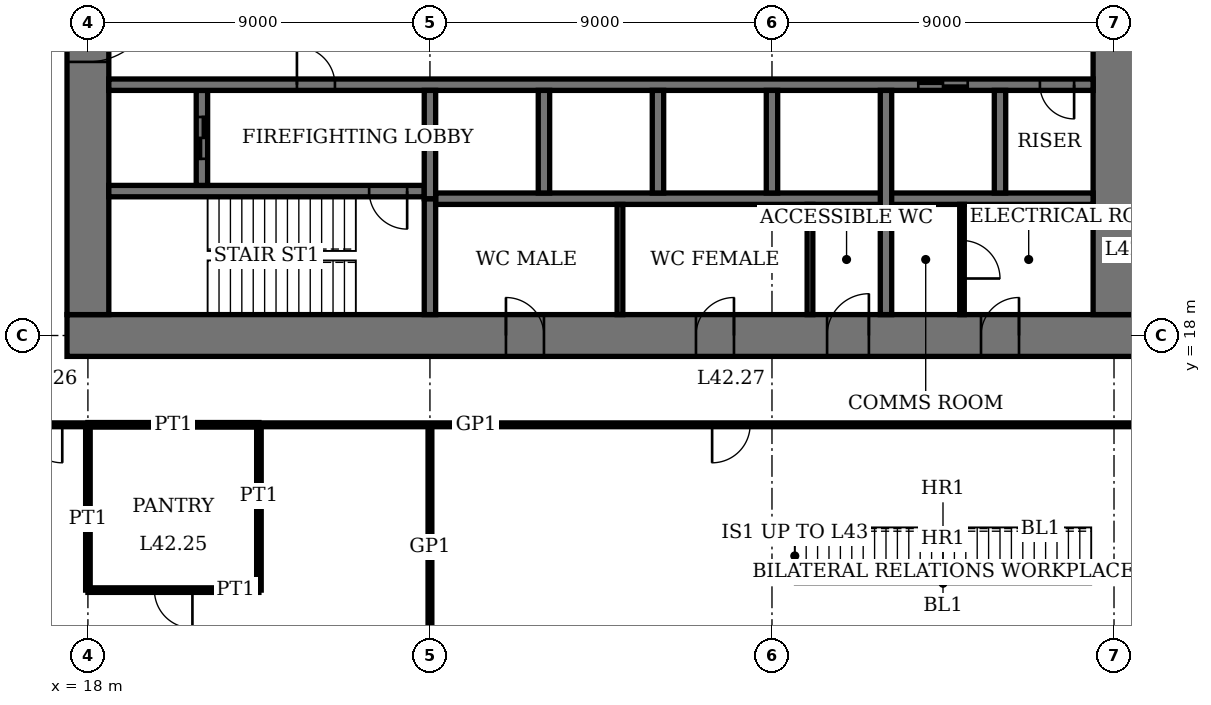
"""IFC4 building model, lengths in metres.
Left out: names, types, materials, properties, quantities, classifications, styles, units other than length and angle.
Written with IfcOpenShell. Run it as: python <this file> out.ifc"""

import sys

from ifc_helpers import new_model, si_unit, direction, frame, frame_2d, origin, place, context, subcontext, project, spatial, rectangle, extrude, element, fill, save


model = new_model("IFC4")
c1 = context("Model", 3, precision=1e-05, world=origin(), true_north=direction((0.0, 1.0)))
c2 = subcontext(c1, "Body", "Model", "MODEL_VIEW")
j1 = project(units=[si_unit("LENGTHUNIT", "METRE"), si_unit("PLANEANGLEUNIT", "RADIAN")], contexts=[c1])
p1 = place(None, origin())
s1 = spatial("IfcSite", under=j1, at=p1, CompositionType="ELEMENT")
p2 = place(p1, origin())
s2 = spatial("IfcBuilding", under=s1, at=p2, CompositionType="ELEMENT")
p3 = place(p2, frame((0.0, 0.0, 174.2)))
s3 = spatial("IfcBuildingStorey", under=s2, at=p3, CompositionType="ELEMENT", Elevation=174.2)
p4 = place(p3, frame((17.45, 18.0, 0.0), z_axis=(0.0, 0.0, 1.0), x_axis=(1.0, 0.0, 0.0)))
e1 = element("IfcWall", 1, at=p4, inside=s3, PredefinedType="SHEAR", context=c2, shape_type="SweptSolid", body=[
    extrude(rectangle(XDim=28.1, YDim=1.1, at=frame_2d((14.05, 0.0))), origin(), (0.0, 0.0, 1.0), 4.0),
])
p5 = place(p4, frame((11.55, 0.0, 0.0)))
e2 = element("IfcOpeningElement", 2, at=p5, cuts=e1, PredefinedType="OPENING", context=c2, shape_type="SweptSolid", body=[
    extrude(rectangle(XDim=1.0, YDim=2.4, at=frame_2d((0.5, 1.2))), frame((0.0, 0.56, 0.0), z_axis=(0.0, -1.0, 0.0), x_axis=(1.0, 0.0, 0.0)), (0.0, 0.0, 1.0), 1.12),
])
p6 = place(p4, frame((16.55, 0.0, 0.0)))
e3 = element("IfcOpeningElement", 3, at=p6, cuts=e1, PredefinedType="OPENING", context=c2, shape_type="SweptSolid", body=[
    extrude(rectangle(XDim=1.0, YDim=2.4, at=frame_2d((0.5, 1.2))), frame((0.0, 0.56, 0.0), z_axis=(0.0, -1.0, 0.0), x_axis=(1.0, 0.0, 0.0)), (0.0, 0.0, 1.0), 1.12),
])
p7 = place(p4, frame((20.0, 0.0, 0.0)))
e4 = element("IfcOpeningElement", 4, at=p7, cuts=e1, PredefinedType="OPENING", context=c2, shape_type="SweptSolid", body=[
    extrude(rectangle(XDim=1.1, YDim=2.4, at=frame_2d((0.55, 1.2))), frame((0.0, 0.56, 0.0), z_axis=(0.0, -1.0, 0.0), x_axis=(1.0, 0.0, 0.0)), (0.0, 0.0, 1.0), 1.12),
])
p8 = place(p4, frame((24.05, 0.0, 0.0)))
e5 = element("IfcOpeningElement", 5, at=p8, cuts=e1, PredefinedType="OPENING", context=c2, shape_type="SweptSolid", body=[
    extrude(rectangle(XDim=1.0, YDim=2.4, at=frame_2d((0.5, 1.2))), frame((0.0, 0.56, 0.0), z_axis=(0.0, -1.0, 0.0), x_axis=(1.0, 0.0, 0.0)), (0.0, 0.0, 1.0), 1.12),
])
p9 = place(p3, frame((18.0, 35.45, 0.0), z_axis=(0.0, 0.0, 1.0), x_axis=(0.0, -1.0, 0.0)))
e6 = element("IfcWall", 6, at=p9, inside=s3, PredefinedType="SHEAR", context=c2, shape_type="SweptSolid", body=[
    extrude(rectangle(XDim=16.9, YDim=1.1, at=frame_2d((8.45, 0.0))), origin(), (0.0, 0.0, 1.0), 4.0),
])
p10 = place(p9, frame((8.45, 0.0, 0.0)))
e7 = element("IfcOpeningElement", 7, at=p10, cuts=e6, PredefinedType="OPENING", context=c2, shape_type="SweptSolid", body=[
    extrude(rectangle(XDim=1.8, YDim=2.4, at=frame_2d((0.9, 1.2))), frame((0.0, 0.56, 0.0), z_axis=(0.0, -1.0, 0.0), x_axis=(1.0, 0.0, 0.0)), (0.0, 0.0, 1.0), 1.12),
])
p11 = place(p3, frame((45.0, 18.55, 0.0), z_axis=(0.0, 0.0, 1.0), x_axis=(0.0, 1.0, 0.0)))
e8 = element("IfcWall", 8, at=p11, inside=s3, PredefinedType="SHEAR", context=c2, shape_type="SweptSolid", body=[
    extrude(rectangle(XDim=16.9, YDim=1.1, at=frame_2d((8.45, 0.0))), origin(), (0.0, 0.0, 1.0), 4.0),
])
p12 = place(p11, frame((8.45, 0.0, 0.0)))
e9 = element("IfcOpeningElement", 9, at=p12, cuts=e8, PredefinedType="OPENING", context=c2, shape_type="SweptSolid", body=[
    extrude(rectangle(XDim=1.8, YDim=2.4, at=frame_2d((0.9, 1.2))), frame((0.0, 0.56, 0.0), z_axis=(0.0, -1.0, 0.0), x_axis=(1.0, 0.0, 0.0)), (0.0, 0.0, 1.0), 1.12),
])
p13 = place(p3, frame((18.55, 21.8, 0.0), z_axis=(0.0, 0.0, 1.0), x_axis=(1.0, 0.0, 0.0)))
e10 = element("IfcWall", 10, at=p13, inside=s3, PredefinedType="SHEAR", context=c2, shape_type="SweptSolid", body=[
    extrude(rectangle(XDim=8.3, YDim=0.3, at=frame_2d((4.15, 0.0))), origin(), (0.0, 0.0, 1.0), 4.0),
])
p14 = place(p13, frame((6.85, 0.0, 0.0)))
e11 = element("IfcOpeningElement", 11, at=p14, cuts=e10, PredefinedType="OPENING", context=c2, shape_type="SweptSolid", body=[
    extrude(rectangle(XDim=1.0, YDim=2.4, at=frame_2d((0.5, 1.2))), frame((0.0, 0.16, 0.0), z_axis=(0.0, -1.0, 0.0), x_axis=(1.0, 0.0, 0.0)), (0.0, 0.0, 1.0), 0.32),
])
p15 = place(p3, frame((27.0, 18.55, 0.0), z_axis=(0.0, 0.0, 1.0), x_axis=(0.0, 1.0, 0.0)))
e12 = element("IfcWall", 12, at=p15, inside=s3, PredefinedType="SHEAR", context=c2, shape_type="SweptSolid", body=[
    extrude(rectangle(XDim=3.05, YDim=0.3, at=frame_2d((1.525, 0.0))), origin(), (0.0, 0.0, 1.0), 4.0),
])
p16 = place(p3, frame((21.0, 21.95, 0.0), z_axis=(0.0, 0.0, 1.0), x_axis=(0.0, 1.0, 0.0)))
e13 = element("IfcWall", 13, at=p16, inside=s3, PredefinedType="SHEAR", context=c2, shape_type="SweptSolid", body=[
    extrude(rectangle(XDim=2.5, YDim=0.3, at=frame_2d((1.25, 0.0))), origin(), (0.0, 0.0, 1.0), 4.0),
])
p17 = place(p16, frame((0.7, 0.0, 0.0)))
e14 = element("IfcOpeningElement", 14, at=p17, cuts=e13, PredefinedType="OPENING", context=c2, shape_type="SweptSolid", body=[
    extrude(rectangle(XDim=1.1, YDim=2.4, at=frame_2d((0.55, 1.2))), frame((0.0, 0.16, 0.0), z_axis=(0.0, -1.0, 0.0), x_axis=(1.0, 0.0, 0.0)), (0.0, 0.0, 1.0), 0.32),
])
p18 = place(p3, frame((18.55, 24.6, 0.0), z_axis=(0.0, 0.0, 1.0), x_axis=(1.0, 0.0, 0.0)))
e15 = element("IfcWall", 15, at=p18, inside=s3, PredefinedType="SHEAR", context=c2, shape_type="SweptSolid", body=[
    extrude(rectangle(XDim=25.9, YDim=0.3, at=frame_2d((12.95, 0.0))), origin(), (0.0, 0.0, 1.0), 4.0),
])
p19 = place(p18, frame((4.95, 0.0, 0.0)))
e16 = element("IfcOpeningElement", 16, at=p19, cuts=e15, PredefinedType="OPENING", context=c2, shape_type="SweptSolid", body=[
    extrude(rectangle(XDim=1.0, YDim=2.4, at=frame_2d((0.5, 1.2))), frame((0.0, 0.16, 0.0), z_axis=(0.0, -1.0, 0.0), x_axis=(1.0, 0.0, 0.0)), (0.0, 0.0, 1.0), 0.32),
])
p20 = place(p18, frame((24.5, 0.0, 0.0)))
e17 = element("IfcOpeningElement", 17, at=p20, cuts=e15, PredefinedType="OPENING", context=c2, shape_type="SweptSolid", body=[
    extrude(rectangle(XDim=0.9, YDim=2.1, at=frame_2d((0.45, 1.05))), frame((0.0, 0.16, 0.0), z_axis=(0.0, -1.0, 0.0), x_axis=(1.0, 0.0, 0.0)), (0.0, 0.0, 1.0), 0.32),
])
p21 = place(p18, frame((21.3, 0.0, 0.0)))
e18 = element("IfcOpeningElement", 18, at=p21, cuts=e15, PredefinedType="OPENING", context=c2, shape_type="SweptSolid", body=[
    extrude(rectangle(XDim=1.3, YDim=2.4, at=frame_2d((0.65, 1.2))), frame((0.0, 0.16, 0.0), z_axis=(0.0, -1.0, 0.0), x_axis=(1.0, 0.0, 0.0)), (0.0, 0.0, 1.0), 0.32),
])
p22 = place(p3, frame((27.15, 21.6, 0.0), z_axis=(0.0, 0.0, 1.0), x_axis=(1.0, 0.0, 0.0)))
e19 = element("IfcWall", 19, at=p22, inside=s3, PredefinedType="SHEAR", context=c2, shape_type="SweptSolid", body=[
    extrude(rectangle(XDim=17.3, YDim=0.3, at=frame_2d((8.65, 0.0))), origin(), (0.0, 0.0, 1.0), 4.0),
])
for number, where, z_axis, x_axis in (
    (20, (30.0, 21.75, 0.0), (0.0, 0.0, 1.0), (0.0, 1.0, 0.0)),
    (21, (33.0, 21.75, 0.0), (0.0, 0.0, 1.0), (0.0, 1.0, 0.0)),
    (22, (36.0, 21.75, 0.0), (0.0, 0.0, 1.0), (0.0, 1.0, 0.0)),
):
    element("IfcWall", number, at=place(p3, frame(where, z_axis=z_axis, x_axis=x_axis)), inside=s3, PredefinedType="SHEAR", context=c2, shape_type="SweptSolid", body=[
        extrude(rectangle(XDim=2.7, YDim=0.3, at=frame_2d((1.35, 0.0))), origin(), (0.0, 0.0, 1.0), 4.0),
    ])
p23 = place(p3, frame((39.0, 18.55, 0.0), z_axis=(0.0, 0.0, 1.0), x_axis=(0.0, 1.0, 0.0)))
e23 = element("IfcWall", 23, at=p23, inside=s3, PredefinedType="SHEAR", context=c2, shape_type="SweptSolid", body=[
    extrude(rectangle(XDim=5.9, YDim=0.3, at=frame_2d((2.95, 0.0))), origin(), (0.0, 0.0, 1.0), 4.0),
])
p24 = place(p3, frame((42.0, 21.75, 0.0), z_axis=(0.0, 0.0, 1.0), x_axis=(0.0, 1.0, 0.0)))
e24 = element("IfcWall", 24, at=p24, inside=s3, PredefinedType="SHEAR", context=c2, shape_type="SweptSolid", body=[
    extrude(rectangle(XDim=2.7, YDim=0.3, at=frame_2d((1.35, 0.0))), origin(), (0.0, 0.0, 1.0), 4.0),
])
p25 = place(p3, frame((27.0, 21.6, 0.0), z_axis=(0.0, 0.0, 1.0), x_axis=(0.0, 1.0, 0.0)))
e25 = element("IfcWall", 25, at=p25, inside=s3, PredefinedType="SHEAR", context=c2, shape_type="SweptSolid", body=[
    extrude(rectangle(XDim=2.85, YDim=0.3, at=frame_2d((1.425, 0.0))), origin(), (0.0, 0.0, 1.0), 4.0),
])
p26 = place(p3, frame((18.0, 11.3, 0.0), z_axis=(0.0, 0.0, 1.0), x_axis=(1.0, 0.0, 0.0)))
e26 = element("IfcWall", 26, at=p26, inside=s3, PredefinedType="PARTITIONING", context=c2, shape_type="SweptSolid", body=[
    extrude(rectangle(XDim=4.5, YDim=0.12, at=frame_2d((2.25, 0.0))), origin(), (0.0, 0.0, 1.0), 3.75),
])
p27 = place(p26, frame((1.75, 0.0, 0.0)))
e27 = element("IfcOpeningElement", 27, at=p27, cuts=e26, PredefinedType="OPENING", context=c2, shape_type="SweptSolid", body=[
    extrude(rectangle(XDim=1.0, YDim=2.4, at=frame_2d((0.5, 1.2))), frame((0.0, 0.07, 0.0), z_axis=(0.0, -1.0, 0.0), x_axis=(1.0, 0.0, 0.0)), (0.0, 0.0, 1.0), 0.14),
])
p28 = place(p3, frame((18.0, 15.65, 0.0), z_axis=(0.0, 0.0, 1.0), x_axis=(1.0, 0.0, 0.0)))
e28 = element("IfcWall", 28, at=p28, inside=s3, PredefinedType="PARTITIONING", context=c2, shape_type="SweptSolid", body=[
    extrude(rectangle(XDim=4.5, YDim=0.12, at=frame_2d((2.25, 0.0))), origin(), (0.0, 0.0, 1.0), 3.75),
])
p29 = place(p3, frame((15.65, 15.65, 0.0), z_axis=(0.0, 0.0, 1.0), x_axis=(1.0, 0.0, 0.0)))
e29 = element("IfcWall", 29, at=p29, inside=s3, PredefinedType="PARTITIONING", context=c2, shape_type="SweptSolid", body=[
    extrude(rectangle(XDim=2.35, YDim=0.1, at=frame_2d((1.175, 0.0))), origin(), (0.0, 0.0, 1.0), 3.75),
])
p30 = place(p29, frame((0.675, 0.0, 0.0)))
e30 = element("IfcOpeningElement", 30, at=p30, cuts=e29, PredefinedType="OPENING", context=c2, shape_type="SweptSolid", body=[
    extrude(rectangle(XDim=1.0, YDim=2.4, at=frame_2d((0.5, 1.2))), frame((0.0, 0.06, 0.0), z_axis=(0.0, -1.0, 0.0), x_axis=(1.0, 0.0, 0.0)), (0.0, 0.0, 1.0), 0.12),
])
p31 = place(p3, frame((22.5, 15.65, 0.0), z_axis=(0.0, 0.0, 1.0), x_axis=(1.0, 0.0, 0.0)))
e31 = element("IfcWall", 31, at=p31, inside=s3, PredefinedType="PARTITIONING", context=c2, shape_type="SweptSolid", body=[
    extrude(rectangle(XDim=24.85, YDim=0.1, at=frame_2d((12.425, 0.0))), origin(), (0.0, 0.0, 1.0), 3.75),
])
p32 = place(p31, frame((11.925, 0.0, 0.0)))
e32 = element("IfcOpeningElement", 32, at=p32, cuts=e31, PredefinedType="OPENING", context=c2, shape_type="SweptSolid", body=[
    extrude(rectangle(XDim=1.0, YDim=2.4, at=frame_2d((0.5, 1.2))), frame((0.0, 0.06, 0.0), z_axis=(0.0, -1.0, 0.0), x_axis=(1.0, 0.0, 0.0)), (0.0, 0.0, 1.0), 0.12),
])
p33 = place(p3, frame((18.0, 11.3, 0.0), z_axis=(0.0, 0.0, 1.0), x_axis=(0.0, 1.0, 0.0)))
e33 = element("IfcWall", 33, at=p33, inside=s3, PredefinedType="PARTITIONING", context=c2, shape_type="SweptSolid", body=[
    extrude(rectangle(XDim=4.35, YDim=0.12, at=frame_2d((2.175, 0.0))), origin(), (0.0, 0.0, 1.0), 3.05),
])
p34 = place(p3, frame((22.5, 11.3, 0.0), z_axis=(0.0, 0.0, 1.0), x_axis=(0.0, 1.0, 0.0)))
e34 = element("IfcWall", 34, at=p34, inside=s3, PredefinedType="PARTITIONING", context=c2, shape_type="SweptSolid", body=[
    extrude(rectangle(XDim=4.35, YDim=0.12, at=frame_2d((2.175, 0.0))), origin(), (0.0, 0.0, 1.0), 3.75),
])
p35 = place(p3, frame((27.0, 9.8, 0.0), z_axis=(0.0, 0.0, 1.0), x_axis=(0.0, 1.0, 0.0)))
e35 = element("IfcWall", 35, at=p35, inside=s3, PredefinedType="PARTITIONING", context=c2, shape_type="SweptSolid", body=[
    extrude(rectangle(XDim=5.85, YDim=0.1, at=frame_2d((2.925, 0.0))), origin(), (0.0, 0.0, 1.0), 3.05),
])
for number, where, z_axis, x_axis in (
    (36, (32.0, 18.55, 0.0), (0.0, 0.0, 1.0), (0.0, 1.0, 0.0)),
    (37, (37.0, 18.55, 0.0), (0.0, 0.0, 1.0), (0.0, 1.0, 0.0)),
):
    element("IfcWall", number, at=place(p3, frame(where, z_axis=z_axis, x_axis=x_axis)), inside=s3, PredefinedType="PARTITIONING", context=c2, shape_type="SweptSolid", body=[
        extrude(rectangle(XDim=2.9, YDim=0.15, at=frame_2d((1.45, 0.0))), origin(), (0.0, 0.0, 1.0), 3.75),
    ])
p36 = place(p3, frame((41.0, 18.55, 0.0), z_axis=(0.0, 0.0, 1.0), x_axis=(0.0, 1.0, 0.0)))
e38 = element("IfcWall", 38, at=p36, inside=s3, PredefinedType="PARTITIONING", context=c2, shape_type="SweptSolid", body=[
    extrude(rectangle(XDim=2.9, YDim=0.12, at=frame_2d((1.45, 0.0))), origin(), (0.0, 0.0, 1.0), 3.75),
])
p37 = place(p36, frame((0.95, 0.0, 0.0)))
e39 = element("IfcOpeningElement", 39, at=p37, cuts=e38, PredefinedType="OPENING", context=c2, shape_type="SweptSolid", body=[
    extrude(rectangle(XDim=1.0, YDim=2.4, at=frame_2d((0.5, 1.2))), frame((0.0, 0.07, 0.0), z_axis=(0.0, -1.0, 0.0), x_axis=(1.0, 0.0, 0.0)), (0.0, 0.0, 1.0), 0.14),
])
p38 = place(p10, origin())
e40 = element("IfcDoor", 40, at=p38, inside=s3, OperationType="DOUBLE_DOOR_DOUBLE_SWING", PredefinedType="DOOR", context=c2, shape_type="SweptSolid", body=[
    extrude(rectangle(XDim=1.8, YDim=2.4, at=frame_2d((0.9, 1.2))), frame((0.0, 0.03, 0.0), z_axis=(0.0, -1.0, 0.0), x_axis=(1.0, 0.0, 0.0)), (0.0, 0.0, 1.0), 0.06),
    extrude(rectangle(XDim=0.04, YDim=2.4, at=frame_2d((0.02, 1.2))), frame((0.0, 0.55, 0.0), z_axis=(0.0, -1.0, 0.0), x_axis=(1.0, 0.0, 0.0)), (0.0, 0.0, 1.0), 1.1),
    extrude(rectangle(XDim=0.04, YDim=2.4, at=frame_2d((1.78, 1.2))), frame((0.0, 0.55, 0.0), z_axis=(0.0, -1.0, 0.0), x_axis=(1.0, 0.0, 0.0)), (0.0, 0.0, 1.0), 1.1),
    extrude(rectangle(XDim=1.8, YDim=0.04, at=frame_2d((0.9, 2.38))), frame((0.0, 0.55, 0.0), z_axis=(0.0, -1.0, 0.0), x_axis=(1.0, 0.0, 0.0)), (0.0, 0.0, 1.0), 1.1),
])
fill(e7, e40)
p39 = place(p5, origin())
e41 = element("IfcDoor", 41, at=p39, inside=s3, OperationType="SINGLE_SWING_RIGHT", PredefinedType="DOOR", context=c2, shape_type="SweptSolid", body=[
    extrude(rectangle(XDim=1.0, YDim=2.4, at=frame_2d((0.5, 1.2))), frame((0.0, 0.025, 0.0), z_axis=(0.0, -1.0, 0.0), x_axis=(1.0, 0.0, 0.0)), (0.0, 0.0, 1.0), 0.05),
    extrude(rectangle(XDim=0.04, YDim=2.4, at=frame_2d((0.02, 1.2))), frame((0.0, 0.4, 0.0), z_axis=(0.0, -1.0, 0.0), x_axis=(1.0, 0.0, 0.0)), (0.0, 0.0, 1.0), 0.8),
    extrude(rectangle(XDim=0.04, YDim=2.4, at=frame_2d((0.98, 1.2))), frame((0.0, 0.4, 0.0), z_axis=(0.0, -1.0, 0.0), x_axis=(1.0, 0.0, 0.0)), (0.0, 0.0, 1.0), 0.8),
    extrude(rectangle(XDim=1.0, YDim=0.04, at=frame_2d((0.5, 2.38))), frame((0.0, 0.4, 0.0), z_axis=(0.0, -1.0, 0.0), x_axis=(1.0, 0.0, 0.0)), (0.0, 0.0, 1.0), 0.8),
])
fill(e2, e41)
p40 = place(p6, origin())
e42 = element("IfcDoor", 42, at=p40, inside=s3, OperationType="SINGLE_SWING_LEFT", PredefinedType="DOOR", context=c2, shape_type="SweptSolid", body=[
    extrude(rectangle(XDim=1.0, YDim=2.4, at=frame_2d((0.5, 1.2))), frame((0.0, 0.025, 0.0), z_axis=(0.0, -1.0, 0.0), x_axis=(1.0, 0.0, 0.0)), (0.0, 0.0, 1.0), 0.05),
    extrude(rectangle(XDim=0.04, YDim=2.4, at=frame_2d((0.02, 1.2))), frame((0.0, 0.4, 0.0), z_axis=(0.0, -1.0, 0.0), x_axis=(1.0, 0.0, 0.0)), (0.0, 0.0, 1.0), 0.8),
    extrude(rectangle(XDim=0.04, YDim=2.4, at=frame_2d((0.98, 1.2))), frame((0.0, 0.4, 0.0), z_axis=(0.0, -1.0, 0.0), x_axis=(1.0, 0.0, 0.0)), (0.0, 0.0, 1.0), 0.8),
    extrude(rectangle(XDim=1.0, YDim=0.04, at=frame_2d((0.5, 2.38))), frame((0.0, 0.4, 0.0), z_axis=(0.0, -1.0, 0.0), x_axis=(1.0, 0.0, 0.0)), (0.0, 0.0, 1.0), 0.8),
])
fill(e3, e42)
p41 = place(p7, origin())
e43 = element("IfcDoor", 43, at=p41, inside=s3, OperationType="SINGLE_SWING_LEFT", PredefinedType="DOOR", context=c2, shape_type="SweptSolid", body=[
    extrude(rectangle(XDim=1.1, YDim=2.4, at=frame_2d((0.55, 1.2))), frame((0.0, 0.025, 0.0), z_axis=(0.0, -1.0, 0.0), x_axis=(1.0, 0.0, 0.0)), (0.0, 0.0, 1.0), 0.05),
    extrude(rectangle(XDim=0.04, YDim=2.4, at=frame_2d((0.02, 1.2))), frame((0.0, 0.44, 0.0), z_axis=(0.0, -1.0, 0.0), x_axis=(1.0, 0.0, 0.0)), (0.0, 0.0, 1.0), 0.88),
    extrude(rectangle(XDim=0.04, YDim=2.4, at=frame_2d((1.08, 1.2))), frame((0.0, 0.44, 0.0), z_axis=(0.0, -1.0, 0.0), x_axis=(1.0, 0.0, 0.0)), (0.0, 0.0, 1.0), 0.88),
    extrude(rectangle(XDim=1.1, YDim=0.04, at=frame_2d((0.55, 2.38))), frame((0.0, 0.44, 0.0), z_axis=(0.0, -1.0, 0.0), x_axis=(1.0, 0.0, 0.0)), (0.0, 0.0, 1.0), 0.88),
])
fill(e4, e43)
p42 = place(p8, origin())
e44 = element("IfcDoor", 44, at=p42, inside=s3, OperationType="SINGLE_SWING_LEFT", PredefinedType="DOOR", context=c2, shape_type="SweptSolid", body=[
    extrude(rectangle(XDim=1.0, YDim=2.4, at=frame_2d((0.5, 1.2))), frame((0.0, 0.025, 0.0), z_axis=(0.0, -1.0, 0.0), x_axis=(1.0, 0.0, 0.0)), (0.0, 0.0, 1.0), 0.05),
    extrude(rectangle(XDim=0.04, YDim=2.4, at=frame_2d((0.02, 1.2))), frame((0.0, 0.4, 0.0), z_axis=(0.0, -1.0, 0.0), x_axis=(1.0, 0.0, 0.0)), (0.0, 0.0, 1.0), 0.8),
    extrude(rectangle(XDim=0.04, YDim=2.4, at=frame_2d((0.98, 1.2))), frame((0.0, 0.4, 0.0), z_axis=(0.0, -1.0, 0.0), x_axis=(1.0, 0.0, 0.0)), (0.0, 0.0, 1.0), 0.8),
    extrude(rectangle(XDim=1.0, YDim=0.04, at=frame_2d((0.5, 2.38))), frame((0.0, 0.4, 0.0), z_axis=(0.0, -1.0, 0.0), x_axis=(1.0, 0.0, 0.0)), (0.0, 0.0, 1.0), 0.8),
])
fill(e5, e44)
p43 = place(p14, origin())
e45 = element("IfcDoor", 45, at=p43, inside=s3, OperationType="SINGLE_SWING_RIGHT", PredefinedType="DOOR", context=c2, shape_type="SweptSolid", body=[
    extrude(rectangle(XDim=1.0, YDim=2.4, at=frame_2d((0.5, 1.2))), frame((0.0, 0.03, 0.0), z_axis=(0.0, -1.0, 0.0), x_axis=(1.0, 0.0, 0.0)), (0.0, 0.0, 1.0), 0.06),
])
fill(e11, e45)
p44 = place(p19, origin())
e46 = element("IfcDoor", 46, at=p44, inside=s3, OperationType="SINGLE_SWING_RIGHT", PredefinedType="DOOR", context=c2, shape_type="SweptSolid", body=[
    extrude(rectangle(XDim=1.0, YDim=2.4, at=frame_2d((0.5, 1.2))), frame((0.0, 0.03, 0.0), z_axis=(0.0, -1.0, 0.0), x_axis=(1.0, 0.0, 0.0)), (0.0, 0.0, 1.0), 0.06),
])
fill(e16, e46)
p45 = place(p20, origin())
e47 = element("IfcDoor", 47, at=p45, inside=s3, OperationType="SINGLE_SWING_RIGHT", PredefinedType="DOOR", context=c2, shape_type="SweptSolid", body=[
    extrude(rectangle(XDim=0.9, YDim=2.1, at=frame_2d((0.45, 1.05))), frame((0.0, 0.03, 0.0), z_axis=(0.0, -1.0, 0.0), x_axis=(1.0, 0.0, 0.0)), (0.0, 0.0, 1.0), 0.06),
])
fill(e17, e47)
p46 = place(p27, origin())
e48 = element("IfcDoor", 48, at=p46, inside=s3, OperationType="SINGLE_SWING_RIGHT", PredefinedType="DOOR", context=c2, shape_type="SweptSolid", body=[
    extrude(rectangle(XDim=1.0, YDim=2.4, at=frame_2d((0.5, 1.2))), frame((0.0, 0.025, 0.0), z_axis=(0.0, -1.0, 0.0), x_axis=(1.0, 0.0, 0.0)), (0.0, 0.0, 1.0), 0.05),
])
fill(e27, e48)
p47 = place(p30, origin())
e49 = element("IfcDoor", 49, at=p47, inside=s3, OperationType="SINGLE_SWING_RIGHT", PredefinedType="DOOR", context=c2, shape_type="SweptSolid", body=[
    extrude(rectangle(XDim=1.0, YDim=2.4, at=frame_2d((0.5, 1.2))), frame((0.0, 0.02, 0.0), z_axis=(0.0, -1.0, 0.0), x_axis=(1.0, 0.0, 0.0)), (0.0, 0.0, 1.0), 0.04),
])
fill(e30, e49)
p48 = place(p32, origin())
e50 = element("IfcDoor", 50, at=p48, inside=s3, OperationType="SINGLE_SWING_LEFT", PredefinedType="DOOR", context=c2, shape_type="SweptSolid", body=[
    extrude(rectangle(XDim=1.0, YDim=2.4, at=frame_2d((0.5, 1.2))), frame((0.0, 0.02, 0.0), z_axis=(0.0, -1.0, 0.0), x_axis=(1.0, 0.0, 0.0)), (0.0, 0.0, 1.0), 0.04),
])
fill(e32, e50)
p49 = place(p37, origin())
e51 = element("IfcDoor", 51, at=p49, inside=s3, OperationType="SINGLE_SWING_LEFT", PredefinedType="DOOR", context=c2, shape_type="SweptSolid", body=[
    extrude(rectangle(XDim=1.0, YDim=2.4, at=frame_2d((0.5, 1.2))), frame((0.0, 0.03, 0.0), z_axis=(0.0, -1.0, 0.0), x_axis=(1.0, 0.0, 0.0)), (0.0, 0.0, 1.0), 0.06),
])
fill(e39, e51)
p50 = place(p21, origin())
e52 = element("IfcDoor", 52, at=p50, inside=s3, OperationType="DOUBLE_DOOR_SLIDING", PredefinedType="DOOR", context=c2, shape_type="SweptSolid", body=[
    extrude(rectangle(XDim=1.3, YDim=2.4, at=frame_2d((0.65, 1.2))), frame((0.0, 0.02, 0.0), z_axis=(0.0, -1.0, 0.0), x_axis=(1.0, 0.0, 0.0)), (0.0, 0.0, 1.0), 0.04),
])
fill(e18, e52)
p51 = place(p17, origin())
e53 = element("IfcDoor", 53, at=p51, inside=s3, OperationType="DOUBLE_DOOR_SLIDING", PredefinedType="DOOR", context=c2, shape_type="SweptSolid", body=[
    extrude(rectangle(XDim=1.1, YDim=2.4, at=frame_2d((0.55, 1.2))), frame((0.0, 0.03, 0.0), z_axis=(0.0, -1.0, 0.0), x_axis=(1.0, 0.0, 0.0)), (0.0, 0.0, 1.0), 0.06),
])
fill(e14, e53)
save(model, sys.argv[1])
